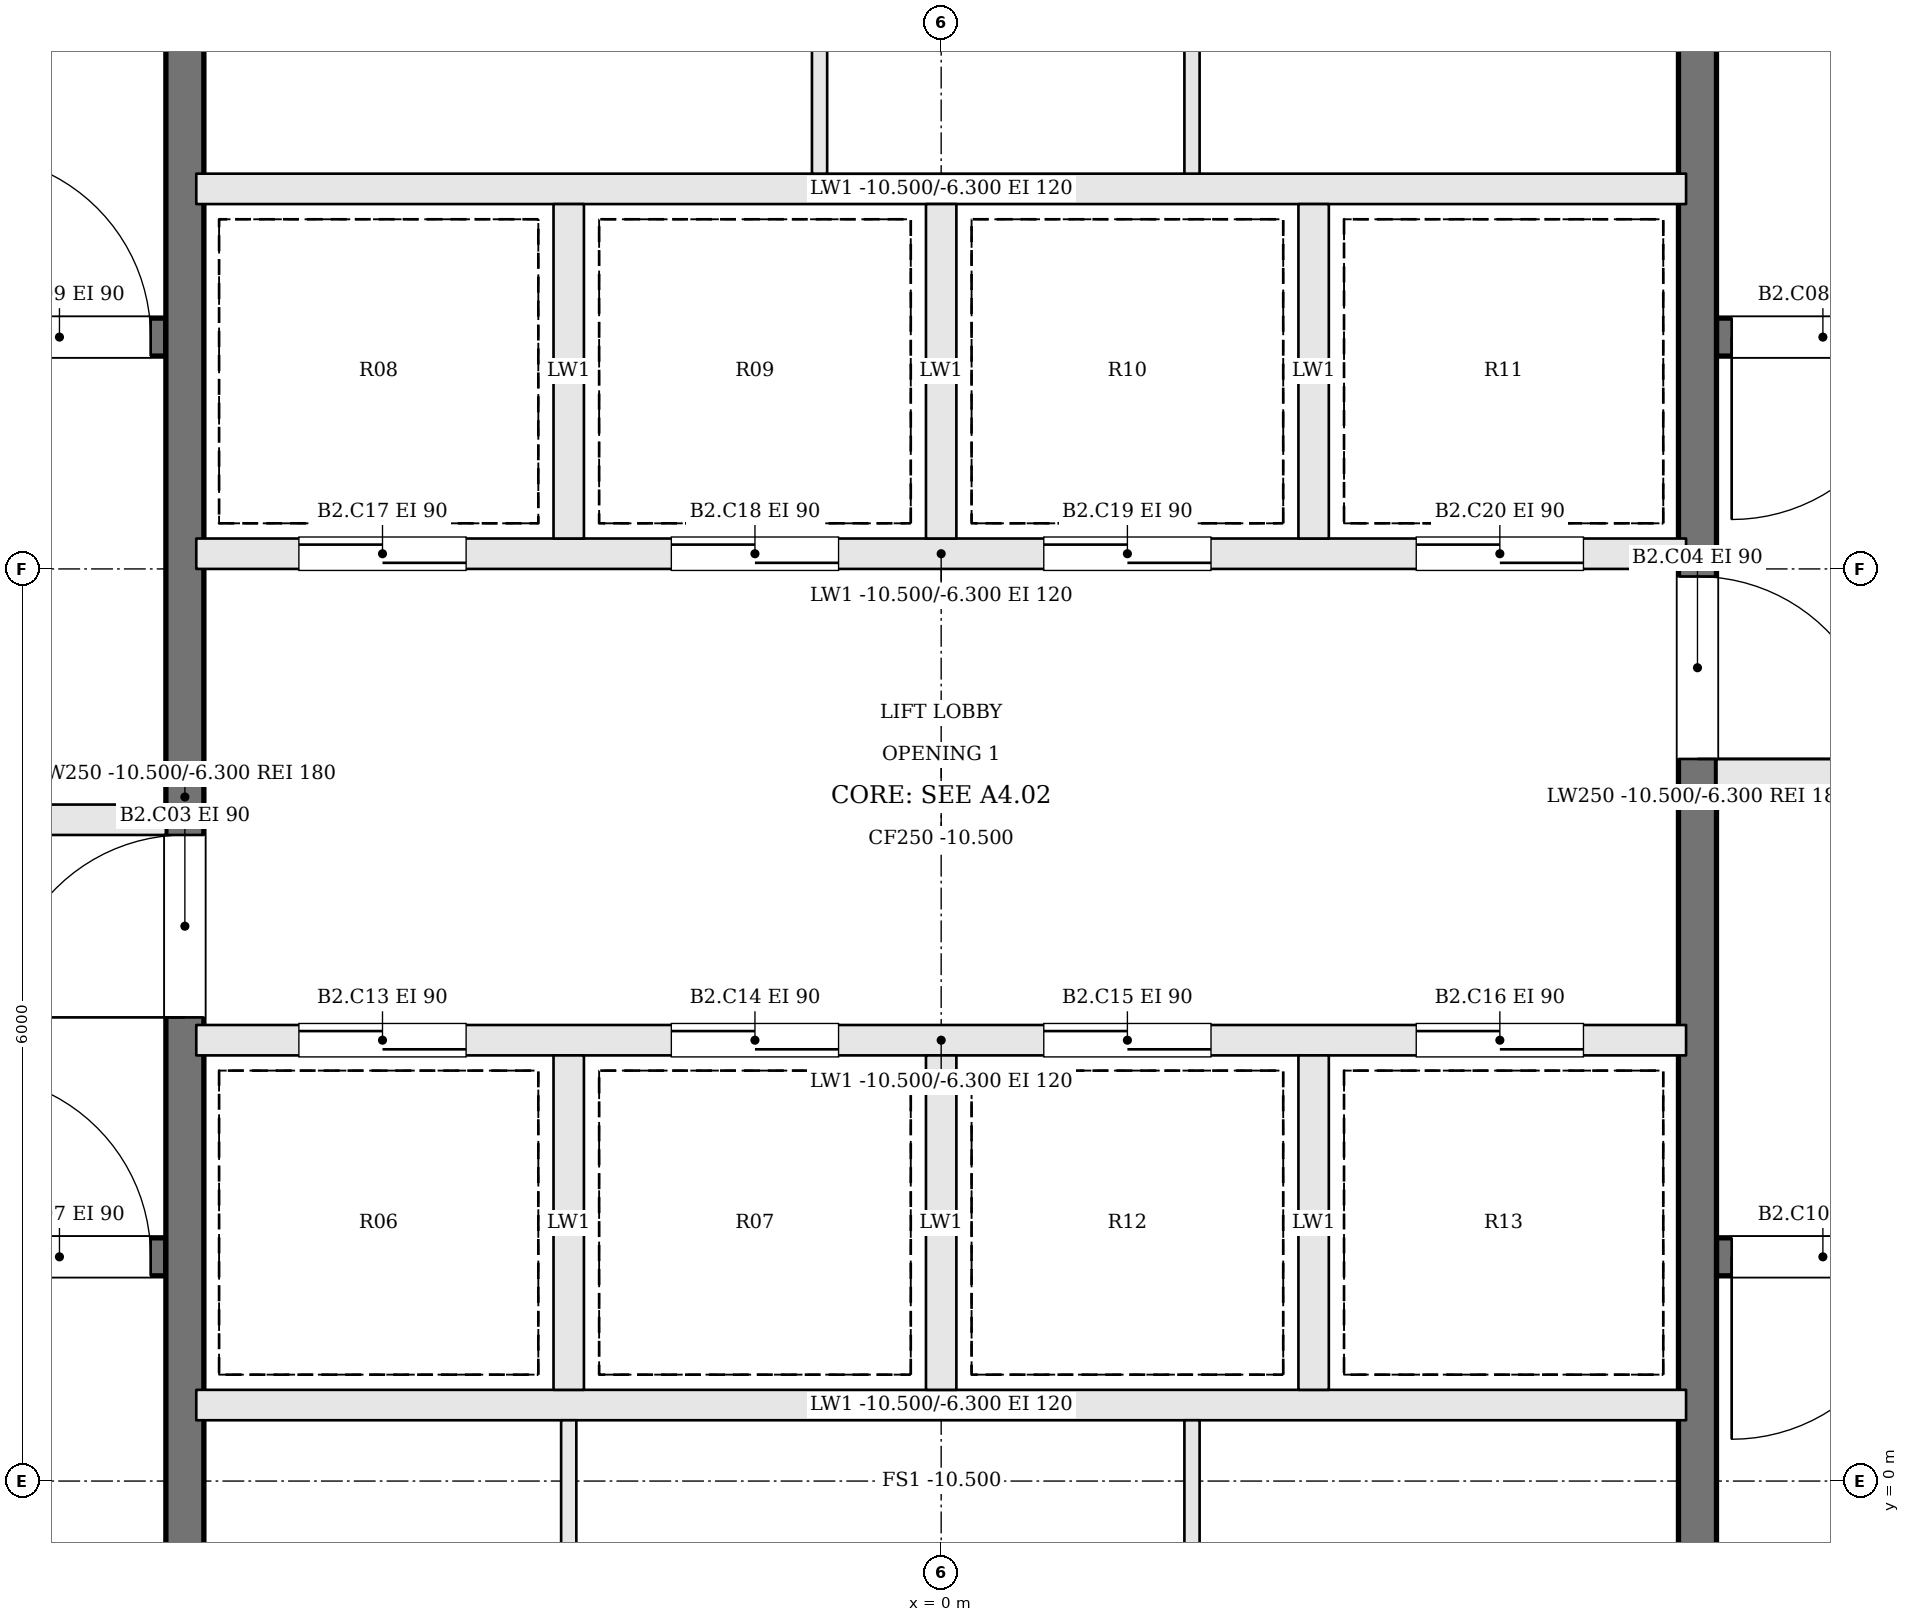
"""IFC4 building model, lengths in metres.
Left out: names, types, materials, properties, quantities, classifications, styles, units other than length and angle.
Written with IfcOpenShell. Run it as: python <this file> out.ifc"""

import sys

from ifc_helpers import new_model, si_unit, direction, frame, frame_2d, origin, place, context, subcontext, project, spatial, rectangle, extrude, element, fill, save


model = new_model("IFC4")
c1 = context("Model", 3, precision=1e-05, world=origin(), true_north=direction((0.0, 1.0)))
c2 = subcontext(c1, "Body", "Model", "MODEL_VIEW")
j1 = project(units=[si_unit("LENGTHUNIT", "METRE"), si_unit("PLANEANGLEUNIT", "RADIAN")], contexts=[c1])
p1 = place(None, origin())
s1 = spatial("IfcSite", under=j1, at=p1, CompositionType="ELEMENT")
p2 = place(p1, origin())
s2 = spatial("IfcBuilding", under=s1, at=p2, CompositionType="ELEMENT")
p3 = place(p2, frame((0.0, 0.0, -10.5)))
s3 = spatial("IfcBuildingStorey", under=s2, at=p3, CompositionType="ELEMENT", Elevation=-10.5)
p4 = place(p3, frame((-11.6, 1.475, 0.0), z_axis=(0.0, 0.0, 1.0), x_axis=(1.0, 0.0, 0.0)))
e1 = element("IfcWall", 1, at=p4, inside=s3, PredefinedType="SOLIDWALL", context=c2, shape_type="SweptSolid", body=[
    extrude(rectangle(XDim=6.5, YDim=0.25, at=frame_2d((3.25, 0.0))), origin(), (0.0, 0.0, 1.0), 4.2),
])
p5 = place(p4, frame((5.2, 0.0, 0.0)))
e2 = element("IfcOpeningElement", 2, at=p5, cuts=e1, PredefinedType="OPENING", context=c2, shape_type="SweptSolid", body=[
    extrude(rectangle(XDim=1.2, YDim=2.1, at=frame_2d((0.6, 1.05))), frame((0.0, 0.135, 0.0), z_axis=(0.0, -1.0, 0.0), x_axis=(1.0, 0.0, 0.0)), (0.0, 0.0, 1.0), 0.27),
])
p6 = place(p3, frame((11.6, 7.525, 0.0), z_axis=(0.0, 0.0, 1.0), x_axis=(-1.0, 0.0, 0.0)))
e3 = element("IfcWall", 3, at=p6, inside=s3, PredefinedType="SOLIDWALL", context=c2, shape_type="SweptSolid", body=[
    extrude(rectangle(XDim=6.5, YDim=0.25, at=frame_2d((3.25, 0.0))), origin(), (0.0, 0.0, 1.0), 4.2),
])
p7 = place(p6, frame((5.2, 0.0, 0.0)))
e4 = element("IfcOpeningElement", 4, at=p7, cuts=e3, PredefinedType="OPENING", context=c2, shape_type="SweptSolid", body=[
    extrude(rectangle(XDim=1.2, YDim=2.1, at=frame_2d((0.6, 1.05))), frame((0.0, 0.135, 0.0), z_axis=(0.0, -1.0, 0.0), x_axis=(1.0, 0.0, 0.0)), (0.0, 0.0, 1.0), 0.27),
])
p8 = place(p3, frame((-11.6, 4.35, 0.0), z_axis=(0.0, 0.0, 1.0), x_axis=(1.0, 0.0, 0.0)))
e5 = element("IfcWall", 5, at=p8, inside=s3, PredefinedType="SOLIDWALL", context=c2, shape_type="SweptSolid", body=[
    extrude(rectangle(XDim=6.5, YDim=0.2, at=frame_2d((3.25, 0.0))), origin(), (0.0, 0.0, 1.0), 4.2),
])
p9 = place(p8, frame((3.8, 0.0, 0.0)))
e6 = element("IfcOpeningElement", 6, at=p9, cuts=e5, PredefinedType="OPENING", context=c2, shape_type="SweptSolid", body=[
    extrude(rectangle(XDim=1.2, YDim=2.1, at=frame_2d((0.6, 1.05))), frame((0.0, 0.11, 0.0), z_axis=(0.0, -1.0, 0.0), x_axis=(1.0, 0.0, 0.0)), (0.0, 0.0, 1.0), 0.22),
])
p10 = place(p8, frame((0.5, 0.0, 0.0)))
e7 = element("IfcOpeningElement", 7, at=p10, cuts=e5, PredefinedType="OPENING", context=c2, shape_type="SweptSolid", body=[
    extrude(rectangle(XDim=1.2, YDim=2.1, at=frame_2d((0.6, 1.05))), frame((0.0, 0.11, 0.0), z_axis=(0.0, -1.0, 0.0), x_axis=(1.0, 0.0, 0.0)), (0.0, 0.0, 1.0), 0.22),
])
p11 = place(p3, frame((11.6, 4.65, 0.0), z_axis=(0.0, 0.0, 1.0), x_axis=(-1.0, 0.0, 0.0)))
e8 = element("IfcWall", 8, at=p11, inside=s3, PredefinedType="SOLIDWALL", context=c2, shape_type="SweptSolid", body=[
    extrude(rectangle(XDim=6.5, YDim=0.2, at=frame_2d((3.25, 0.0))), origin(), (0.0, 0.0, 1.0), 4.2),
])
p12 = place(p11, frame((3.8, 0.0, 0.0)))
e9 = element("IfcOpeningElement", 9, at=p12, cuts=e8, PredefinedType="OPENING", context=c2, shape_type="SweptSolid", body=[
    extrude(rectangle(XDim=1.2, YDim=2.1, at=frame_2d((0.6, 1.05))), frame((0.0, 0.11, 0.0), z_axis=(0.0, -1.0, 0.0), x_axis=(1.0, 0.0, 0.0)), (0.0, 0.0, 1.0), 0.22),
])
p13 = place(p11, frame((0.5, 0.0, 0.0)))
e10 = element("IfcOpeningElement", 10, at=p13, cuts=e8, PredefinedType="OPENING", context=c2, shape_type="SweptSolid", body=[
    extrude(rectangle(XDim=1.2, YDim=2.1, at=frame_2d((0.6, 1.05))), frame((0.0, 0.11, 0.0), z_axis=(0.0, -1.0, 0.0), x_axis=(1.0, 0.0, 0.0)), (0.0, 0.0, 1.0), 0.22),
])
p14 = place(p3, frame((-11.6, 7.525, 0.0), z_axis=(0.0, 0.0, 1.0), x_axis=(1.0, 0.0, 0.0)))
e11 = element("IfcWall", 11, at=p14, inside=s3, PredefinedType="SOLIDWALL", context=c2, shape_type="SweptSolid", body=[
    extrude(rectangle(XDim=6.5, YDim=0.25, at=frame_2d((3.25, 0.0))), origin(), (0.0, 0.0, 1.0), 4.2),
])
p15 = place(p14, frame((5.2, 0.0, 0.0)))
e12 = element("IfcOpeningElement", 12, at=p15, cuts=e11, PredefinedType="OPENING", context=c2, shape_type="SweptSolid", body=[
    extrude(rectangle(XDim=1.2, YDim=2.1, at=frame_2d((0.6, 1.05))), frame((0.0, 0.135, 0.0), z_axis=(0.0, -1.0, 0.0), x_axis=(1.0, 0.0, 0.0)), (0.0, 0.0, 1.0), 0.27),
])
p16 = place(p3, frame((11.6, 1.475, 0.0), z_axis=(0.0, 0.0, 1.0), x_axis=(-1.0, 0.0, 0.0)))
e13 = element("IfcWall", 13, at=p16, inside=s3, PredefinedType="SOLIDWALL", context=c2, shape_type="SweptSolid", body=[
    extrude(rectangle(XDim=6.5, YDim=0.25, at=frame_2d((3.25, 0.0))), origin(), (0.0, 0.0, 1.0), 4.2),
])
p17 = place(p16, frame((5.2, 0.0, 0.0)))
e14 = element("IfcOpeningElement", 14, at=p17, cuts=e13, PredefinedType="OPENING", context=c2, shape_type="SweptSolid", body=[
    extrude(rectangle(XDim=1.2, YDim=2.1, at=frame_2d((0.6, 1.05))), frame((0.0, 0.135, 0.0), z_axis=(0.0, -1.0, 0.0), x_axis=(1.0, 0.0, 0.0)), (0.0, 0.0, 1.0), 0.27),
])
p18 = place(p3, frame((-4.975, -1.6, 0.0), z_axis=(0.0, 0.0, 1.0), x_axis=(0.0, 1.0, 0.0)))
e15 = element("IfcWall", 15, at=p18, inside=s3, PredefinedType="SOLIDWALL", context=c2, shape_type="SweptSolid", body=[
    extrude(rectangle(XDim=12.2, YDim=0.25, at=frame_2d((6.1, 0.0))), origin(), (0.0, 0.0, 1.0), 4.2),
])
p19 = place(p18, frame((4.65, 0.0, 0.0)))
e16 = element("IfcOpeningElement", 16, at=p19, cuts=e15, PredefinedType="OPENING", context=c2, shape_type="SweptSolid", body=[
    extrude(rectangle(XDim=1.2, YDim=2.1, at=frame_2d((0.6, 1.05))), frame((0.0, 0.135, 0.0), z_axis=(0.0, -1.0, 0.0), x_axis=(1.0, 0.0, 0.0)), (0.0, 0.0, 1.0), 0.27),
])
p20 = place(p3, frame((4.975, 10.6, 0.0), z_axis=(0.0, 0.0, 1.0), x_axis=(0.0, -1.0, 0.0)))
e17 = element("IfcWall", 17, at=p20, inside=s3, PredefinedType="SOLIDWALL", context=c2, shape_type="SweptSolid", body=[
    extrude(rectangle(XDim=12.2, YDim=0.25, at=frame_2d((6.1, 0.0))), origin(), (0.0, 0.0, 1.0), 4.2),
])
p21 = place(p20, frame((4.65, 0.0, 0.0)))
e18 = element("IfcOpeningElement", 18, at=p21, cuts=e17, PredefinedType="OPENING", context=c2, shape_type="SweptSolid", body=[
    extrude(rectangle(XDim=1.2, YDim=2.1, at=frame_2d((0.6, 1.05))), frame((0.0, 0.135, 0.0), z_axis=(0.0, -1.0, 0.0), x_axis=(1.0, 0.0, 0.0)), (0.0, 0.0, 1.0), 0.27),
])
p22 = place(p3, frame((-4.9, 0.5, 0.0), z_axis=(0.0, 0.0, 1.0), x_axis=(1.0, 0.0, 0.0)))
e19 = element("IfcWall", 19, at=p22, inside=s3, PredefinedType="SOLIDWALL", context=c2, shape_type="SweptSolid", body=[
    extrude(rectangle(XDim=9.8, YDim=0.2, at=frame_2d((4.9, 0.0))), origin(), (0.0, 0.0, 1.0), 4.2),
])
p23 = place(p3, frame((-4.9, 2.9, 0.0), z_axis=(0.0, 0.0, 1.0), x_axis=(1.0, 0.0, 0.0)))
e20 = element("IfcWall", 20, at=p23, inside=s3, PredefinedType="SOLIDWALL", context=c2, shape_type="SweptSolid", body=[
    extrude(rectangle(XDim=9.8, YDim=0.2, at=frame_2d((4.9, 0.0))), origin(), (0.0, 0.0, 1.0), 4.2),
])
p24 = place(p23, frame((0.675, 0.0, 0.0)))
e21 = element("IfcOpeningElement", 21, at=p24, cuts=e20, PredefinedType="OPENING", context=c2, shape_type="SweptSolid", body=[
    extrude(rectangle(XDim=1.1, YDim=2.1, at=frame_2d((0.55, 1.05))), frame((0.0, 0.11, 0.0), z_axis=(0.0, -1.0, 0.0), x_axis=(1.0, 0.0, 0.0)), (0.0, 0.0, 1.0), 0.22),
])
p25 = place(p23, frame((3.125, 0.0, 0.0)))
e22 = element("IfcOpeningElement", 22, at=p25, cuts=e20, PredefinedType="OPENING", context=c2, shape_type="SweptSolid", body=[
    extrude(rectangle(XDim=1.1, YDim=2.1, at=frame_2d((0.55, 1.05))), frame((0.0, 0.11, 0.0), z_axis=(0.0, -1.0, 0.0), x_axis=(1.0, 0.0, 0.0)), (0.0, 0.0, 1.0), 0.22),
])
p26 = place(p23, frame((5.575, 0.0, 0.0)))
e23 = element("IfcOpeningElement", 23, at=p26, cuts=e20, PredefinedType="OPENING", context=c2, shape_type="SweptSolid", body=[
    extrude(rectangle(XDim=1.1, YDim=2.1, at=frame_2d((0.55, 1.05))), frame((0.0, 0.11, 0.0), z_axis=(0.0, -1.0, 0.0), x_axis=(1.0, 0.0, 0.0)), (0.0, 0.0, 1.0), 0.22),
])
p27 = place(p23, frame((8.025, 0.0, 0.0)))
e24 = element("IfcOpeningElement", 24, at=p27, cuts=e20, PredefinedType="OPENING", context=c2, shape_type="SweptSolid", body=[
    extrude(rectangle(XDim=1.1, YDim=2.1, at=frame_2d((0.55, 1.05))), frame((0.0, 0.11, 0.0), z_axis=(0.0, -1.0, 0.0), x_axis=(1.0, 0.0, 0.0)), (0.0, 0.0, 1.0), 0.22),
])
p28 = place(p3, frame((-4.9, 6.1, 0.0), z_axis=(0.0, 0.0, 1.0), x_axis=(1.0, 0.0, 0.0)))
e25 = element("IfcWall", 25, at=p28, inside=s3, PredefinedType="SOLIDWALL", context=c2, shape_type="SweptSolid", body=[
    extrude(rectangle(XDim=9.8, YDim=0.2, at=frame_2d((4.9, 0.0))), origin(), (0.0, 0.0, 1.0), 4.2),
])
p29 = place(p28, frame((0.675, 0.0, 0.0)))
e26 = element("IfcOpeningElement", 26, at=p29, cuts=e25, PredefinedType="OPENING", context=c2, shape_type="SweptSolid", body=[
    extrude(rectangle(XDim=1.1, YDim=2.1, at=frame_2d((0.55, 1.05))), frame((0.0, 0.11, 0.0), z_axis=(0.0, -1.0, 0.0), x_axis=(1.0, 0.0, 0.0)), (0.0, 0.0, 1.0), 0.22),
])
p30 = place(p28, frame((3.125, 0.0, 0.0)))
e27 = element("IfcOpeningElement", 27, at=p30, cuts=e25, PredefinedType="OPENING", context=c2, shape_type="SweptSolid", body=[
    extrude(rectangle(XDim=1.1, YDim=2.1, at=frame_2d((0.55, 1.05))), frame((0.0, 0.11, 0.0), z_axis=(0.0, -1.0, 0.0), x_axis=(1.0, 0.0, 0.0)), (0.0, 0.0, 1.0), 0.22),
])
p31 = place(p28, frame((5.575, 0.0, 0.0)))
e28 = element("IfcOpeningElement", 28, at=p31, cuts=e25, PredefinedType="OPENING", context=c2, shape_type="SweptSolid", body=[
    extrude(rectangle(XDim=1.1, YDim=2.1, at=frame_2d((0.55, 1.05))), frame((0.0, 0.11, 0.0), z_axis=(0.0, -1.0, 0.0), x_axis=(1.0, 0.0, 0.0)), (0.0, 0.0, 1.0), 0.22),
])
p32 = place(p28, frame((8.025, 0.0, 0.0)))
e29 = element("IfcOpeningElement", 29, at=p32, cuts=e25, PredefinedType="OPENING", context=c2, shape_type="SweptSolid", body=[
    extrude(rectangle(XDim=1.1, YDim=2.1, at=frame_2d((0.55, 1.05))), frame((0.0, 0.11, 0.0), z_axis=(0.0, -1.0, 0.0), x_axis=(1.0, 0.0, 0.0)), (0.0, 0.0, 1.0), 0.22),
])
p33 = place(p3, frame((-4.9, 8.5, 0.0), z_axis=(0.0, 0.0, 1.0), x_axis=(1.0, 0.0, 0.0)))
e30 = element("IfcWall", 30, at=p33, inside=s3, PredefinedType="SOLIDWALL", context=c2, shape_type="SweptSolid", body=[
    extrude(rectangle(XDim=9.8, YDim=0.2, at=frame_2d((4.9, 0.0))), origin(), (0.0, 0.0, 1.0), 4.2),
])
for number, where, z_axis, x_axis in (
    (31, (-2.45, 0.6, 0.0), (0.0, 0.0, 1.0), (0.0, 1.0, 0.0)),
    (32, (0.0, 0.6, 0.0), (0.0, 0.0, 1.0), (0.0, 1.0, 0.0)),
    (33, (2.45, 0.6, 0.0), (0.0, 0.0, 1.0), (0.0, 1.0, 0.0)),
    (34, (-2.45, 6.2, 0.0), (0.0, 0.0, 1.0), (0.0, 1.0, 0.0)),
    (35, (0.0, 6.2, 0.0), (0.0, 0.0, 1.0), (0.0, 1.0, 0.0)),
    (36, (2.45, 6.2, 0.0), (0.0, 0.0, 1.0), (0.0, 1.0, 0.0)),
):
    element("IfcWall", number, at=place(p3, frame(where, z_axis=z_axis, x_axis=x_axis)), inside=s3, PredefinedType="SOLIDWALL", context=c2, shape_type="SweptSolid", body=[
        extrude(rectangle(XDim=2.2, YDim=0.2, at=frame_2d((1.1, 0.0))), origin(), (0.0, 0.0, 1.0), 4.2),
    ])
for number, where, z_axis, x_axis in (
    (37, (-2.45, -1.6, 0.0), (0.0, 0.0, 1.0), (0.0, 1.0, 0.0)),
    (38, (1.65, -1.6, 0.0), (0.0, 0.0, 1.0), (0.0, 1.0, 0.0)),
    (39, (-0.8, 8.6, 0.0), (0.0, 0.0, 1.0), (0.0, 1.0, 0.0)),
    (40, (1.65, 8.6, 0.0), (0.0, 0.0, 1.0), (0.0, 1.0, 0.0)),
):
    element("IfcWall", number, at=place(p3, frame(where, z_axis=z_axis, x_axis=x_axis)), inside=s3, PredefinedType="PARTITIONING", context=c2, shape_type="SweptSolid", body=[
        extrude(rectangle(XDim=2.0, YDim=0.1, at=frame_2d((1.0, 0.0))), origin(), (0.0, 0.0, 1.0), 4.2),
    ])
p34 = place(p19, origin())
e41 = element("IfcDoor", 41, at=p34, inside=s3, OperationType="SINGLE_SWING_LEFT", PredefinedType="DOOR", context=c2, shape_type="SweptSolid", body=[
    extrude(rectangle(XDim=1.2, YDim=2.1, at=frame_2d((0.6, 1.05))), frame((0.0, 0.025, 0.0), z_axis=(0.0, -1.0, 0.0), x_axis=(1.0, 0.0, 0.0)), (0.0, 0.0, 1.0), 0.05),
])
fill(e16, e41)
p35 = place(p21, origin())
e42 = element("IfcDoor", 42, at=p35, inside=s3, OperationType="SINGLE_SWING_RIGHT", PredefinedType="DOOR", context=c2, shape_type="SweptSolid", body=[
    extrude(rectangle(XDim=1.2, YDim=2.1, at=frame_2d((0.6, 1.05))), frame((0.0, 0.025, 0.0), z_axis=(0.0, -1.0, 0.0), x_axis=(1.0, 0.0, 0.0)), (0.0, 0.0, 1.0), 0.05),
])
fill(e18, e42)
p36 = place(p5, origin())
e43 = element("IfcDoor", 43, at=p36, inside=s3, OperationType="SINGLE_SWING_LEFT", PredefinedType="DOOR", context=c2, shape_type="SweptSolid", body=[
    extrude(rectangle(XDim=1.2, YDim=2.1, at=frame_2d((0.6, 1.05))), frame((0.0, 0.025, 0.0), z_axis=(0.0, -1.0, 0.0), x_axis=(1.0, 0.0, 0.0)), (0.0, 0.0, 1.0), 0.05),
])
fill(e2, e43)
p37 = place(p7, origin())
e44 = element("IfcDoor", 44, at=p37, inside=s3, OperationType="SINGLE_SWING_RIGHT", PredefinedType="DOOR", context=c2, shape_type="SweptSolid", body=[
    extrude(rectangle(XDim=1.2, YDim=2.1, at=frame_2d((0.6, 1.05))), frame((0.0, 0.025, 0.0), z_axis=(0.0, -1.0, 0.0), x_axis=(1.0, 0.0, 0.0)), (0.0, 0.0, 1.0), 0.05),
])
fill(e4, e44)
p38 = place(p15, origin())
e45 = element("IfcDoor", 45, at=p38, inside=s3, OperationType="SINGLE_SWING_LEFT", PredefinedType="DOOR", context=c2, shape_type="SweptSolid", body=[
    extrude(rectangle(XDim=1.2, YDim=2.1, at=frame_2d((0.6, 1.05))), frame((0.0, 0.025, 0.0), z_axis=(0.0, -1.0, 0.0), x_axis=(1.0, 0.0, 0.0)), (0.0, 0.0, 1.0), 0.05),
])
fill(e12, e45)
p39 = place(p17, origin())
e46 = element("IfcDoor", 46, at=p39, inside=s3, OperationType="SINGLE_SWING_RIGHT", PredefinedType="DOOR", context=c2, shape_type="SweptSolid", body=[
    extrude(rectangle(XDim=1.2, YDim=2.1, at=frame_2d((0.6, 1.05))), frame((0.0, 0.025, 0.0), z_axis=(0.0, -1.0, 0.0), x_axis=(1.0, 0.0, 0.0)), (0.0, 0.0, 1.0), 0.05),
])
fill(e14, e46)
p40 = place(p24, origin())
e47 = element("IfcDoor", 47, at=p40, inside=s3, OperationType="SLIDING_TO_RIGHT", PredefinedType="DOOR", context=c2, shape_type="SweptSolid", body=[
    extrude(rectangle(XDim=1.1, YDim=2.1, at=frame_2d((0.55, 1.05))), frame((0.0, 0.025, 0.0), z_axis=(0.0, -1.0, 0.0), x_axis=(1.0, 0.0, 0.0)), (0.0, 0.0, 1.0), 0.05),
])
fill(e21, e47)
p41 = place(p25, origin())
e48 = element("IfcDoor", 48, at=p41, inside=s3, OperationType="SLIDING_TO_LEFT", PredefinedType="DOOR", context=c2, shape_type="SweptSolid", body=[
    extrude(rectangle(XDim=1.1, YDim=2.1, at=frame_2d((0.55, 1.05))), frame((0.0, 0.025, 0.0), z_axis=(0.0, -1.0, 0.0), x_axis=(1.0, 0.0, 0.0)), (0.0, 0.0, 1.0), 0.05),
])
fill(e22, e48)
p42 = place(p26, origin())
e49 = element("IfcDoor", 49, at=p42, inside=s3, OperationType="SLIDING_TO_LEFT", PredefinedType="DOOR", context=c2, shape_type="SweptSolid", body=[
    extrude(rectangle(XDim=1.1, YDim=2.1, at=frame_2d((0.55, 1.05))), frame((0.0, 0.025, 0.0), z_axis=(0.0, -1.0, 0.0), x_axis=(1.0, 0.0, 0.0)), (0.0, 0.0, 1.0), 0.05),
])
fill(e23, e49)
p43 = place(p27, origin())
e50 = element("IfcDoor", 50, at=p43, inside=s3, OperationType="SLIDING_TO_RIGHT", PredefinedType="DOOR", context=c2, shape_type="SweptSolid", body=[
    extrude(rectangle(XDim=1.1, YDim=2.1, at=frame_2d((0.55, 1.05))), frame((0.0, 0.025, 0.0), z_axis=(0.0, -1.0, 0.0), x_axis=(1.0, 0.0, 0.0)), (0.0, 0.0, 1.0), 0.05),
])
fill(e24, e50)
p44 = place(p29, origin())
e51 = element("IfcDoor", 51, at=p44, inside=s3, OperationType="SLIDING_TO_RIGHT", PredefinedType="DOOR", context=c2, shape_type="SweptSolid", body=[
    extrude(rectangle(XDim=1.1, YDim=2.1, at=frame_2d((0.55, 1.05))), frame((0.0, 0.025, 0.0), z_axis=(0.0, -1.0, 0.0), x_axis=(1.0, 0.0, 0.0)), (0.0, 0.0, 1.0), 0.05),
])
fill(e26, e51)
p45 = place(p30, origin())
e52 = element("IfcDoor", 52, at=p45, inside=s3, OperationType="SLIDING_TO_LEFT", PredefinedType="DOOR", context=c2, shape_type="SweptSolid", body=[
    extrude(rectangle(XDim=1.1, YDim=2.1, at=frame_2d((0.55, 1.05))), frame((0.0, 0.025, 0.0), z_axis=(0.0, -1.0, 0.0), x_axis=(1.0, 0.0, 0.0)), (0.0, 0.0, 1.0), 0.05),
])
fill(e27, e52)
p46 = place(p31, origin())
e53 = element("IfcDoor", 53, at=p46, inside=s3, OperationType="SLIDING_TO_RIGHT", PredefinedType="DOOR", context=c2, shape_type="SweptSolid", body=[
    extrude(rectangle(XDim=1.1, YDim=2.1, at=frame_2d((0.55, 1.05))), frame((0.0, 0.025, 0.0), z_axis=(0.0, -1.0, 0.0), x_axis=(1.0, 0.0, 0.0)), (0.0, 0.0, 1.0), 0.05),
])
fill(e28, e53)
p47 = place(p32, origin())
e54 = element("IfcDoor", 54, at=p47, inside=s3, OperationType="SLIDING_TO_LEFT", PredefinedType="DOOR", context=c2, shape_type="SweptSolid", body=[
    extrude(rectangle(XDim=1.1, YDim=2.1, at=frame_2d((0.55, 1.05))), frame((0.0, 0.025, 0.0), z_axis=(0.0, -1.0, 0.0), x_axis=(1.0, 0.0, 0.0)), (0.0, 0.0, 1.0), 0.05),
])
fill(e29, e54)
save(model, sys.argv[1])
